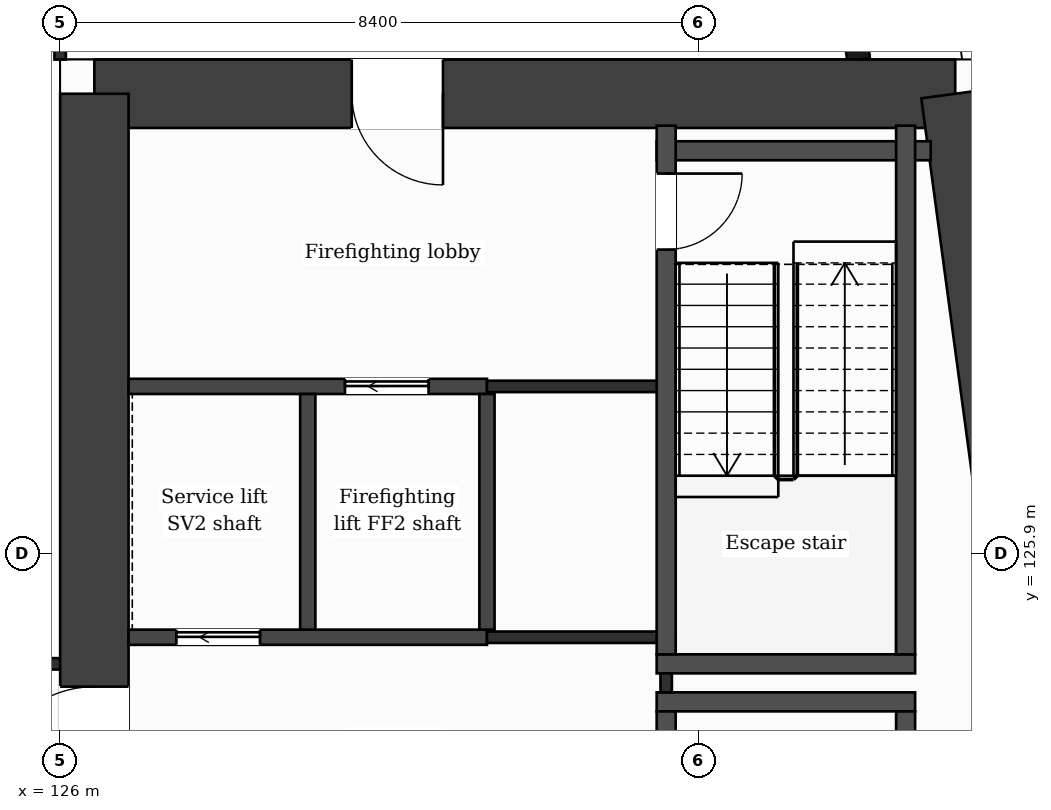
"""IFC4 building model, lengths in metres.
Left out: names, types, materials, properties, quantities, classifications, styles, units other than length and angle.
Written with IfcOpenShell. Run it as: python <this file> out.ifc"""

import sys

from ifc_helpers import new_model, si_unit, direction, frame, frame_2d, origin, place, context, subcontext, project, spatial, rectangle, extrude, element, fill, save


model = new_model("IFC4")
c1 = context("Model", 3, precision=1e-05, world=origin(), true_north=direction((0.0, 1.0)))
c2 = subcontext(c1, "Body", "Model", "MODEL_VIEW")
j1 = project(units=[si_unit("LENGTHUNIT", "METRE"), si_unit("PLANEANGLEUNIT", "RADIAN")], contexts=[c1])
p1 = place(None, origin())
s1 = spatial("IfcSite", under=j1, at=p1, CompositionType="ELEMENT")
p2 = place(p1, origin())
s2 = spatial("IfcBuilding", under=s1, at=p2, CompositionType="ELEMENT")
p3 = place(p2, frame((0.0, 0.0, 170.0)))
s3 = spatial("IfcBuildingStorey", under=s2, at=p3, CompositionType="ELEMENT", Elevation=170.0)
p4 = place(p3, frame((126.45, 131.95, 0.0), z_axis=(0.0, 0.0, 1.0), x_axis=(1.0, 0.0, 0.0)))
e1 = element("IfcWall", 1, at=p4, inside=s3, PredefinedType="SHEAR", context=c2, shape_type="SweptSolid", body=[
    extrude(rectangle(XDim=11.326, YDim=0.9, at=frame_2d((5.663, 0.0))), origin(), (0.0, 0.0, 1.0), 3.7),
])
p5 = place(p4, frame((3.386, 0.0, 0.0)))
e2 = element("IfcOpeningElement", 2, at=p5, cuts=e1, PredefinedType="OPENING", context=c2, shape_type="SweptSolid", body=[
    extrude(rectangle(XDim=1.2, YDim=2.1, at=frame_2d((0.6, 1.05))), frame((0.0, 0.46, 0.0), z_axis=(0.0, -1.0, 0.0), x_axis=(1.0, 0.0, 0.0)), (0.0, 0.0, 1.0), 0.92),
])
p6 = place(p3, frame((137.776, 131.95, 0.0), z_axis=(0.0, 0.0, 1.0), x_axis=(0.133421759112, -0.991059349482, 0.0)))
e3 = element("IfcWall", 3, at=p6, inside=s3, PredefinedType="SHEAR", context=c2, shape_type="SweptSolid", body=[
    extrude(rectangle(XDim=21.29, YDim=0.9, at=frame_2d((10.645, 0.0))), origin(), (0.0, 0.0, 1.0), 3.7),
])
p7 = place(p3, frame((126.45, 110.85, 0.0), z_axis=(0.0, 0.0, 1.0), x_axis=(0.0, 1.0, 0.0)))
e4 = element("IfcWall", 4, at=p7, inside=s3, PredefinedType="SHEAR", context=c2, shape_type="SweptSolid", body=[
    extrude(rectangle(XDim=21.1, YDim=0.9, at=frame_2d((10.55, 0.0))), origin(), (0.0, 0.0, 1.0), 3.7),
])
p8 = place(p7, frame((11.9, 0.0, 0.0)))
e5 = element("IfcOpeningElement", 5, at=p8, cuts=e4, PredefinedType="OPENING", context=c2, shape_type="SweptSolid", body=[
    extrude(rectangle(XDim=1.4, YDim=2.1, at=frame_2d((0.7, 1.05))), frame((0.0, 0.46, 0.0), z_axis=(0.0, -1.0, 0.0), x_axis=(1.0, 0.0, 0.0)), (0.0, 0.0, 1.0), 0.92),
])
p9 = place(p3, frame((136.504, 132.4, 0.0), z_axis=(0.0, 0.0, 1.0), x_axis=(-0.133399697462, 0.99106231929, 0.0)))
e6 = element("IfcWall", 6, at=p9, inside=s3, PredefinedType="SOLIDWALL", context=c2, shape_type="SweptSolid", body=[
    extrude(rectangle(XDim=6.74, YDim=0.3, at=frame_2d((3.37, 0.0))), origin(), (0.0, 0.0, 1.0), 3.38),
])
p10 = place(p9, frame((1.115, 0.0, 0.0)))
e7 = element("IfcOpeningElement", 7, at=p10, cuts=e6, PredefinedType="OPENING", context=c2, shape_type="SweptSolid", body=[
    extrude(rectangle(XDim=1.2, YDim=2.4, at=frame_2d((0.6, 1.2))), frame((0.0, 0.16, 0.0), z_axis=(0.0, -1.0, 0.0), x_axis=(1.0, 0.0, 0.0)), (0.0, 0.0, 1.0), 0.32),
])
p11 = place(p9, frame((3.835, 0.0, 0.9)))
e8 = element("IfcOpeningElement", 8, at=p11, cuts=e6, PredefinedType="OPENING", context=c2, shape_type="SweptSolid", body=[
    extrude(rectangle(XDim=2.4, YDim=2.1, at=frame_2d((1.2, 1.05))), frame((0.0, 0.16, 0.0), z_axis=(0.0, -1.0, 0.0), x_axis=(1.0, 0.0, 0.0)), (0.0, 0.0, 1.0), 0.32),
])
for number, where, z_axis, x_axis in (
    (9, (133.848, 123.95, 0.0), (0.0, 0.0, 1.0), (1.0, 0.0, 0.0)),
    (10, (133.848, 124.45, 0.0), (0.0, 0.0, 1.0), (1.0, 0.0, 0.0)),
):
    element("IfcWall", number, at=place(p3, frame(where, z_axis=z_axis, x_axis=x_axis)), inside=s3, PredefinedType="PARTITIONING", context=c2, shape_type="SweptSolid", body=[
        extrude(rectangle(XDim=3.4, YDim=0.25, at=frame_2d((1.7, 0.0))), origin(), (0.0, 0.0, 1.0), 3.38),
    ])
p12 = place(p3, frame((100.8, 124.45, 0.0), z_axis=(0.0, 0.0, 1.0), x_axis=(1.0, 0.0, 0.0)))
e11 = element("IfcWall", 11, at=p12, inside=s3, PredefinedType="PARTITIONING", context=c2, shape_type="SweptSolid", body=[
    extrude(rectangle(XDim=25.2, YDim=0.15, at=frame_2d((12.6, 0.0))), origin(), (0.0, 0.0, 1.0), 3.38),
])
p13 = place(p12, frame((4.275, 0.0, 0.0)))
e12 = element("IfcOpeningElement", 12, at=p13, cuts=e11, PredefinedType="OPENING", context=c2, shape_type="SweptSolid", body=[
    extrude(rectangle(XDim=1.0, YDim=2.1, at=frame_2d((0.5, 1.05))), frame((0.0, 0.085, 0.0), z_axis=(0.0, -1.0, 0.0), x_axis=(1.0, 0.0, 0.0)), (0.0, 0.0, 1.0), 0.17),
])
p14 = place(p12, frame((0.675, 0.0, 0.0)))
e13 = element("IfcOpeningElement", 13, at=p14, cuts=e11, PredefinedType="OPENING", context=c2, shape_type="SweptSolid", body=[
    extrude(rectangle(XDim=1.0, YDim=2.1, at=frame_2d((0.5, 1.05))), frame((0.0, 0.085, 0.0), z_axis=(0.0, -1.0, 0.0), x_axis=(1.0, 0.0, 0.0)), (0.0, 0.0, 1.0), 0.17),
])
p15 = place(p12, frame((10.425, 0.0, 0.0)))
e14 = element("IfcOpeningElement", 14, at=p15, cuts=e11, PredefinedType="OPENING", context=c2, shape_type="SweptSolid", body=[
    extrude(rectangle(XDim=1.0, YDim=2.1, at=frame_2d((0.5, 1.05))), frame((0.0, 0.085, 0.0), z_axis=(0.0, -1.0, 0.0), x_axis=(1.0, 0.0, 0.0)), (0.0, 0.0, 1.0), 0.17),
])
p16 = place(p12, frame((22.175, 0.0, 0.0)))
e15 = element("IfcOpeningElement", 15, at=p16, cuts=e11, PredefinedType="OPENING", context=c2, shape_type="SweptSolid", body=[
    extrude(rectangle(XDim=1.0, YDim=2.1, at=frame_2d((0.5, 1.05))), frame((0.0, 0.085, 0.0), z_axis=(0.0, -1.0, 0.0), x_axis=(1.0, 0.0, 0.0)), (0.0, 0.0, 1.0), 0.17),
])
p17 = place(p3, frame((126.9, 124.8, 0.0), z_axis=(0.0, 0.0, 1.0), x_axis=(1.0, 0.0, 0.0)))
e16 = element("IfcWall", 16, at=p17, inside=s3, PredefinedType="PARTITIONING", context=c2, shape_type="SweptSolid", body=[
    extrude(rectangle(XDim=4.715, YDim=0.2, at=frame_2d((2.358, 0.0))), origin(), (0.0, 0.0, 1.0), 3.38),
])
p18 = place(p17, frame((0.629, 0.0, 0.0)))
e17 = element("IfcOpeningElement", 17, at=p18, cuts=e16, PredefinedType="OPENING", context=c2, shape_type="SweptSolid", body=[
    extrude(rectangle(XDim=1.1, YDim=2.1, at=frame_2d((0.55, 1.05))), frame((0.0, 0.11, 0.0), z_axis=(0.0, -1.0, 0.0), x_axis=(1.0, 0.0, 0.0)), (0.0, 0.0, 1.0), 0.22),
])
p19 = place(p3, frame((131.615, 124.8, 0.0), z_axis=(0.0, 0.0, 1.0), x_axis=(1.0, 0.0, 0.0)))
e18 = element("IfcWall", 18, at=p19, inside=s3, PredefinedType="PARTITIONING", context=c2, shape_type="SweptSolid", body=[
    extrude(rectangle(XDim=2.483, YDim=0.15, at=frame_2d((1.241, 0.0))), origin(), (0.0, 0.0, 1.0), 3.38),
])
p20 = place(p3, frame((126.9, 128.1, 0.0), z_axis=(0.0, 0.0, 1.0), x_axis=(1.0, 0.0, 0.0)))
e19 = element("IfcWall", 19, at=p20, inside=s3, PredefinedType="PARTITIONING", context=c2, shape_type="SweptSolid", body=[
    extrude(rectangle(XDim=4.715, YDim=0.2, at=frame_2d((2.358, 0.0))), origin(), (0.0, 0.0, 1.0), 3.38),
])
p21 = place(p20, frame((2.847, 0.0, 0.0)))
e20 = element("IfcOpeningElement", 20, at=p21, cuts=e19, PredefinedType="OPENING", context=c2, shape_type="SweptSolid", body=[
    extrude(rectangle(XDim=1.1, YDim=2.1, at=frame_2d((0.55, 1.05))), frame((0.0, 0.11, 0.0), z_axis=(0.0, -1.0, 0.0), x_axis=(1.0, 0.0, 0.0)), (0.0, 0.0, 1.0), 0.22),
])
p22 = place(p3, frame((131.615, 128.1, 0.0), z_axis=(0.0, 0.0, 1.0), x_axis=(1.0, 0.0, 0.0)))
e21 = element("IfcWall", 21, at=p22, inside=s3, PredefinedType="PARTITIONING", context=c2, shape_type="SweptSolid", body=[
    extrude(rectangle(XDim=2.358, YDim=0.15, at=frame_2d((1.179, 0.0))), origin(), (0.0, 0.0, 1.0), 3.38),
])
p23 = place(p3, frame((133.848, 131.2, 0.0), z_axis=(0.0, 0.0, 1.0), x_axis=(1.0, 0.0, 0.0)))
e22 = element("IfcWall", 22, at=p23, inside=s3, PredefinedType="PARTITIONING", context=c2, shape_type="SweptSolid", body=[
    extrude(rectangle(XDim=3.605, YDim=0.25, at=frame_2d((1.802, 0.0))), origin(), (0.0, 0.0, 1.0), 3.38),
])
p24 = place(p3, frame((126.0, 132.4, 0.0), z_axis=(0.0, 0.0, 1.0), x_axis=(0.0, 1.0, 0.0)))
e23 = element("IfcWall", 23, at=p24, inside=s3, PredefinedType="PARTITIONING", context=c2, shape_type="SweptSolid", body=[
    extrude(rectangle(XDim=1.325, YDim=0.15, at=frame_2d((0.663, 0.0))), origin(), (0.0, 0.0, 1.0), 3.38),
])
for number, where, z_axis, x_axis in (
    (24, (129.258, 124.9, 0.0), (0.0, 0.0, 1.0), (0.0, 1.0, 0.0)),
    (25, (131.615, 124.9, 0.0), (0.0, 0.0, 1.0), (0.0, 1.0, 0.0)),
):
    element("IfcWall", number, at=place(p3, frame(where, z_axis=z_axis, x_axis=x_axis)), inside=s3, PredefinedType="PARTITIONING", context=c2, shape_type="SweptSolid", body=[
        extrude(rectangle(XDim=3.1, YDim=0.2, at=frame_2d((1.55, 0.0))), origin(), (0.0, 0.0, 1.0), 3.38),
    ])
p25 = place(p3, frame((133.973, 124.075, 0.0), z_axis=(0.0, 0.0, 1.0), x_axis=(0.0, 1.0, 0.0)))
e26 = element("IfcWall", 26, at=p25, inside=s3, PredefinedType="PARTITIONING", context=c2, shape_type="SweptSolid", body=[
    extrude(rectangle(XDim=0.25, YDim=0.15, at=frame_2d((0.125, 0.0))), origin(), (0.0, 0.0, 1.0), 3.38),
])
p26 = place(p3, frame((133.973, 116.87, 0.0), z_axis=(0.0, 0.0, 1.0), x_axis=(0.0, 1.0, 0.0)))
e27 = element("IfcWall", 27, at=p26, inside=s3, PredefinedType="PARTITIONING", context=c2, shape_type="SweptSolid", body=[
    extrude(rectangle(XDim=6.955, YDim=0.25, at=frame_2d((3.478, 0.0))), origin(), (0.0, 0.0, 1.0), 3.38),
])
p27 = place(p26, frame((5.655, 0.0, 0.0)))
e28 = element("IfcOpeningElement", 28, at=p27, cuts=e27, PredefinedType="OPENING", context=c2, shape_type="SweptSolid", body=[
    extrude(rectangle(XDim=0.95, YDim=2.1, at=frame_2d((0.475, 1.05))), frame((0.0, 0.135, 0.0), z_axis=(0.0, -1.0, 0.0), x_axis=(1.0, 0.0, 0.0)), (0.0, 0.0, 1.0), 0.27),
])
p28 = place(p3, frame((133.973, 124.575, 0.0), z_axis=(0.0, 0.0, 1.0), x_axis=(0.0, 1.0, 0.0)))
e29 = element("IfcWall", 29, at=p28, inside=s3, PredefinedType="PARTITIONING", context=c2, shape_type="SweptSolid", body=[
    extrude(rectangle(XDim=6.955, YDim=0.25, at=frame_2d((3.478, 0.0))), origin(), (0.0, 0.0, 1.0), 3.38),
])
p29 = place(p28, frame((5.325, 0.0, 0.0)))
e30 = element("IfcOpeningElement", 30, at=p29, cuts=e29, PredefinedType="OPENING", context=c2, shape_type="SweptSolid", body=[
    extrude(rectangle(XDim=1.0, YDim=2.1, at=frame_2d((0.5, 1.05))), frame((0.0, 0.135, 0.0), z_axis=(0.0, -1.0, 0.0), x_axis=(1.0, 0.0, 0.0)), (0.0, 0.0, 1.0), 0.27),
])
p30 = place(p3, frame((137.123, 116.87, 0.0), z_axis=(0.0, 0.0, 1.0), x_axis=(0.0, 1.0, 0.0)))
e31 = element("IfcWall", 31, at=p30, inside=s3, PredefinedType="PARTITIONING", context=c2, shape_type="SweptSolid", body=[
    extrude(rectangle(XDim=6.955, YDim=0.25, at=frame_2d((3.478, 0.0))), origin(), (0.0, 0.0, 1.0), 3.38),
])
p31 = place(p3, frame((137.123, 124.575, 0.0), z_axis=(0.0, 0.0, 1.0), x_axis=(0.0, 1.0, 0.0)))
e32 = element("IfcWall", 32, at=p31, inside=s3, PredefinedType="PARTITIONING", context=c2, shape_type="SweptSolid", body=[
    extrude(rectangle(XDim=6.955, YDim=0.25, at=frame_2d((3.478, 0.0))), origin(), (0.0, 0.0, 1.0), 3.38),
])
p32 = place(p21, origin())
e33 = element("IfcDoor", 33, at=p32, inside=s3, OperationType="SLIDING_TO_LEFT", PredefinedType="DOOR", context=c2, shape_type="SweptSolid", body=[
    extrude(rectangle(XDim=1.1, YDim=2.1, at=frame_2d((0.55, 1.05))), frame((0.0, 0.025, 0.0), z_axis=(0.0, -1.0, 0.0), x_axis=(1.0, 0.0, 0.0)), (0.0, 0.0, 1.0), 0.05),
])
fill(e20, e33)
p33 = place(p18, origin())
e34 = element("IfcDoor", 34, at=p33, inside=s3, OperationType="SLIDING_TO_LEFT", PredefinedType="DOOR", context=c2, shape_type="SweptSolid", body=[
    extrude(rectangle(XDim=1.1, YDim=2.1, at=frame_2d((0.55, 1.05))), frame((0.0, 0.025, 0.0), z_axis=(0.0, -1.0, 0.0), x_axis=(1.0, 0.0, 0.0)), (0.0, 0.0, 1.0), 0.05),
])
fill(e17, e34)
p34 = place(p29, origin())
e35 = element("IfcDoor", 35, at=p34, inside=s3, OperationType="SINGLE_SWING_RIGHT", PredefinedType="DOOR", context=c2, shape_type="SweptSolid", body=[
    extrude(rectangle(XDim=1.0, YDim=2.1, at=frame_2d((0.5, 1.05))), frame((0.0, 0.025, 0.0), z_axis=(0.0, -1.0, 0.0), x_axis=(1.0, 0.0, 0.0)), (0.0, 0.0, 1.0), 0.05),
])
fill(e30, e35)
p35 = place(p5, origin())
e36 = element("IfcDoor", 36, at=p35, inside=s3, OperationType="SINGLE_SWING_RIGHT", PredefinedType="DOOR", context=c2, shape_type="SweptSolid", body=[
    extrude(rectangle(XDim=1.2, YDim=2.1, at=frame_2d((0.6, 1.05))), frame((0.0, 0.025, 0.0), z_axis=(0.0, -1.0, 0.0), x_axis=(1.0, 0.0, 0.0)), (0.0, 0.0, 1.0), 0.05),
])
fill(e2, e36)
p36 = place(p8, origin())
e37 = element("IfcDoor", 37, at=p36, inside=s3, OperationType="SINGLE_SWING_LEFT", PredefinedType="DOOR", context=c2, shape_type="SweptSolid", body=[
    extrude(rectangle(XDim=1.4, YDim=2.1, at=frame_2d((0.7, 1.05))), frame((0.0, 0.025, 0.0), z_axis=(0.0, -1.0, 0.0), x_axis=(1.0, 0.0, 0.0)), (0.0, 0.0, 1.0), 0.05),
])
fill(e5, e37)
save(model, sys.argv[1])
